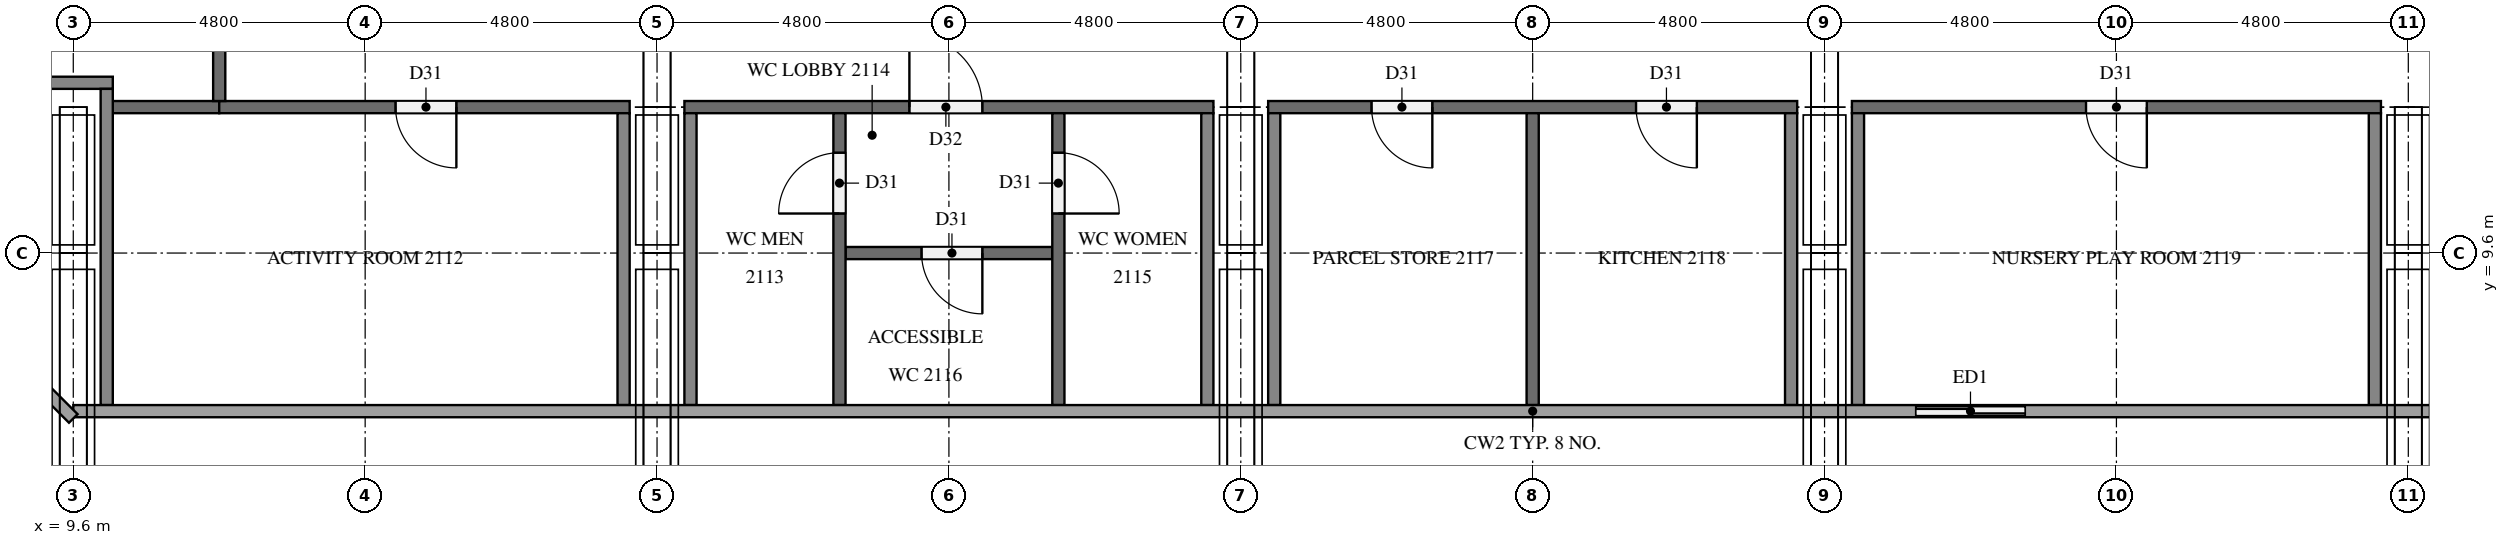
"""IFC4 building model, lengths in metres.
Left out: names, types, materials, properties, quantities, classifications, styles, units other than length and angle.
Written with IfcOpenShell. Run it as: python <this file> out.ifc"""

import sys

from ifc_helpers import new_model, si_unit, direction, frame, frame_2d, origin, place, context, subcontext, project, spatial, rectangle, extrude, element, fill, save


model = new_model("IFC4")
c1 = context("Model", 3, precision=1e-05, world=origin(), true_north=direction((0.0, 1.0)))
c2 = subcontext(c1, "Body", "Model", "MODEL_VIEW")
j1 = project(units=[si_unit("LENGTHUNIT", "METRE"), si_unit("PLANEANGLEUNIT", "RADIAN")], contexts=[c1])
p1 = place(None, origin())
s1 = spatial("IfcSite", under=j1, at=p1, CompositionType="ELEMENT")
p2 = place(p1, origin())
s2 = spatial("IfcBuilding", under=s1, at=p2, CompositionType="ELEMENT")
p3 = place(p2, frame((0.0, 0.0, 83.8)))
s3 = spatial("IfcBuildingStorey", under=s2, at=p3, CompositionType="ELEMENT", Elevation=83.8)
p4 = place(p3, frame((39.6, 7.0, 0.0), z_axis=(0.0, 0.0, 1.0), x_axis=(1.0, 0.0, 0.0)))
e1 = element("IfcWall", 1, at=p4, inside=s3, PredefinedType="SOLIDWALL", context=c2, shape_type="SweptSolid", body=[
    extrude(rectangle(XDim=2.4, YDim=0.15, at=frame_2d((1.2, 0.0))), origin(), (0.0, 0.0, 1.0), 5.1),
])
p5 = place(p4, frame((0.3, 0.0, 0.0)))
e2 = element("IfcOpeningElement", 2, at=p5, cuts=e1, PredefinedType="OPENING", context=c2, shape_type="SweptSolid", body=[
    extrude(rectangle(XDim=1.8, YDim=2.4, at=frame_2d((0.9, 1.2))), frame((0.0, 0.085, 0.0), z_axis=(0.0, -1.0, 0.0), x_axis=(1.0, 0.0, 0.0)), (0.0, 0.0, 1.0), 0.17),
])
p6 = place(p3, frame((25.7, 9.6, 0.0), z_axis=(0.0, 0.0, 1.0), x_axis=(-1.0, 0.0, 0.0)))
e3 = element("IfcWall", 3, at=p6, inside=s3, PredefinedType="PARTITIONING", context=c2, shape_type="SweptSolid", body=[
    extrude(rectangle(XDim=3.4, YDim=0.2, at=frame_2d((1.7, 0.0))), origin(), (0.0, 0.0, 1.0), 5.1),
])
p7 = place(p6, frame((1.15, 0.0, 0.0)))
e4 = element("IfcOpeningElement", 4, at=p7, cuts=e3, PredefinedType="OPENING", context=c2, shape_type="SweptSolid", body=[
    extrude(rectangle(XDim=1.0, YDim=2.1, at=frame_2d((0.5, 1.05))), frame((0.0, 0.11, 0.0), z_axis=(0.0, -1.0, 0.0), x_axis=(1.0, 0.0, 0.0)), (0.0, 0.0, 1.0), 0.22),
])
p8 = place(p3, frame((10.25, 12.0, 0.0), z_axis=(0.0, 0.0, 1.0), x_axis=(1.0, 0.0, 0.0)))
e5 = element("IfcWall", 5, at=p8, inside=s3, PredefinedType="PARTITIONING", context=c2, shape_type="SweptSolid", body=[
    extrude(rectangle(XDim=1.75, YDim=0.2, at=frame_2d((0.875, 0.0))), origin(), (0.0, 0.0, 1.0), 5.1),
])
p9 = place(p3, frame((18.75, 12.0, 0.0), z_axis=(0.0, 0.0, 1.0), x_axis=(-1.0, 0.0, 0.0)))
e6 = element("IfcWall", 6, at=p9, inside=s3, PredefinedType="PARTITIONING", context=c2, shape_type="SweptSolid", body=[
    extrude(rectangle(XDim=6.75, YDim=0.2, at=frame_2d((3.375, 0.0))), origin(), (0.0, 0.0, 1.0), 5.1),
])
p10 = place(p9, frame((2.85, 0.0, 0.0)))
e7 = element("IfcOpeningElement", 7, at=p10, cuts=e6, PredefinedType="OPENING", context=c2, shape_type="SweptSolid", body=[
    extrude(rectangle(XDim=1.0, YDim=2.1, at=frame_2d((0.5, 1.05))), frame((0.0, 0.11, 0.0), z_axis=(0.0, -1.0, 0.0), x_axis=(1.0, 0.0, 0.0)), (0.0, 0.0, 1.0), 0.22),
])
p11 = place(p3, frame((19.65, 12.0, 0.0), z_axis=(0.0, 0.0, 1.0), x_axis=(1.0, 0.0, 0.0)))
e8 = element("IfcWall", 8, at=p11, inside=s3, PredefinedType="PARTITIONING", context=c2, shape_type="SweptSolid", body=[
    extrude(rectangle(XDim=8.7, YDim=0.2, at=frame_2d((4.35, 0.0))), origin(), (0.0, 0.0, 1.0), 5.1),
])
p12 = place(p11, frame((3.7, 0.0, 0.0)))
e9 = element("IfcOpeningElement", 9, at=p12, cuts=e8, PredefinedType="OPENING", context=c2, shape_type="SweptSolid", body=[
    extrude(rectangle(XDim=1.2, YDim=2.1, at=frame_2d((0.6, 1.05))), frame((0.0, 0.11, 0.0), z_axis=(0.0, -1.0, 0.0), x_axis=(1.0, 0.0, 0.0)), (0.0, 0.0, 1.0), 0.22),
])
p13 = place(p3, frame((37.95, 12.0, 0.0), z_axis=(0.0, 0.0, 1.0), x_axis=(-1.0, 0.0, 0.0)))
e10 = element("IfcWall", 10, at=p13, inside=s3, PredefinedType="PARTITIONING", context=c2, shape_type="SweptSolid", body=[
    extrude(rectangle(XDim=8.7, YDim=0.2, at=frame_2d((4.35, 0.0))), origin(), (0.0, 0.0, 1.0), 5.1),
])
p14 = place(p13, frame((6.0, 0.0, 0.0)))
e11 = element("IfcOpeningElement", 11, at=p14, cuts=e10, PredefinedType="OPENING", context=c2, shape_type="SweptSolid", body=[
    extrude(rectangle(XDim=1.0, YDim=2.1, at=frame_2d((0.5, 1.05))), frame((0.0, 0.11, 0.0), z_axis=(0.0, -1.0, 0.0), x_axis=(1.0, 0.0, 0.0)), (0.0, 0.0, 1.0), 0.22),
])
p15 = place(p13, frame((1.65, 0.0, 0.0)))
e12 = element("IfcOpeningElement", 12, at=p15, cuts=e10, PredefinedType="OPENING", context=c2, shape_type="SweptSolid", body=[
    extrude(rectangle(XDim=1.0, YDim=2.1, at=frame_2d((0.5, 1.05))), frame((0.0, 0.11, 0.0), z_axis=(0.0, -1.0, 0.0), x_axis=(1.0, 0.0, 0.0)), (0.0, 0.0, 1.0), 0.22),
])
p16 = place(p3, frame((47.55, 12.0, 0.0), z_axis=(0.0, 0.0, 1.0), x_axis=(-1.0, 0.0, 0.0)))
e13 = element("IfcWall", 13, at=p16, inside=s3, PredefinedType="PARTITIONING", context=c2, shape_type="SweptSolid", body=[
    extrude(rectangle(XDim=8.7, YDim=0.2, at=frame_2d((4.35, 0.0))), origin(), (0.0, 0.0, 1.0), 5.1),
])
p17 = place(p16, frame((3.85, 0.0, 0.0)))
e14 = element("IfcOpeningElement", 14, at=p17, cuts=e13, PredefinedType="OPENING", context=c2, shape_type="SweptSolid", body=[
    extrude(rectangle(XDim=1.0, YDim=2.1, at=frame_2d((0.5, 1.05))), frame((0.0, 0.11, 0.0), z_axis=(0.0, -1.0, 0.0), x_axis=(1.0, 0.0, 0.0)), (0.0, 0.0, 1.0), 0.22),
])
p18 = place(p3, frame((8.95, 12.4, 0.0), z_axis=(0.0, 0.0, 1.0), x_axis=(1.0, 0.0, 0.0)))
e15 = element("IfcWall", 15, at=p18, inside=s3, PredefinedType="PARTITIONING", context=c2, shape_type="SweptSolid", body=[
    extrude(rectangle(XDim=1.3, YDim=0.2, at=frame_2d((0.65, 0.0))), origin(), (0.0, 0.0, 1.0), 5.1),
])
p19 = place(p3, frame((10.15, 7.1, 0.0), z_axis=(0.0, 0.0, 1.0), x_axis=(0.0, 1.0, 0.0)))
e16 = element("IfcWall", 16, at=p19, inside=s3, PredefinedType="PARTITIONING", context=c2, shape_type="SweptSolid", body=[
    extrude(rectangle(XDim=5.2, YDim=0.2, at=frame_2d((2.6, 0.0))), origin(), (0.0, 0.0, 1.0), 5.1),
])
p20 = place(p3, frame((12.0, 12.1, 0.0), z_axis=(0.0, 0.0, 1.0), x_axis=(0.0, 1.0, 0.0)))
e17 = element("IfcWall", 17, at=p20, inside=s3, PredefinedType="PARTITIONING", context=c2, shape_type="SweptSolid", body=[
    extrude(rectangle(XDim=28.6, YDim=0.2, at=frame_2d((14.3, 0.0))), origin(), (0.0, 0.0, 1.0), 5.1),
])
p21 = place(p20, frame((3.05, 0.0, 0.0)))
e18 = element("IfcOpeningElement", 18, at=p21, cuts=e17, PredefinedType="OPENING", context=c2, shape_type="SweptSolid", body=[
    extrude(rectangle(XDim=1.0, YDim=2.1, at=frame_2d((0.5, 1.05))), frame((0.0, 0.11, 0.0), z_axis=(0.0, -1.0, 0.0), x_axis=(1.0, 0.0, 0.0)), (0.0, 0.0, 1.0), 0.22),
])
p22 = place(p20, frame((9.05, 0.0, 0.0)))
e19 = element("IfcOpeningElement", 19, at=p22, cuts=e17, PredefinedType="OPENING", context=c2, shape_type="SweptSolid", body=[
    extrude(rectangle(XDim=1.0, YDim=2.1, at=frame_2d((0.5, 1.05))), frame((0.0, 0.11, 0.0), z_axis=(0.0, -1.0, 0.0), x_axis=(1.0, 0.0, 0.0)), (0.0, 0.0, 1.0), 0.22),
])
p23 = place(p20, frame((13.85, 0.0, 0.0)))
e20 = element("IfcOpeningElement", 20, at=p23, cuts=e17, PredefinedType="OPENING", context=c2, shape_type="SweptSolid", body=[
    extrude(rectangle(XDim=1.0, YDim=2.1, at=frame_2d((0.5, 1.05))), frame((0.0, 0.11, 0.0), z_axis=(0.0, -1.0, 0.0), x_axis=(1.0, 0.0, 0.0)), (0.0, 0.0, 1.0), 0.22),
])
p24 = place(p20, frame((18.65, 0.0, 0.0)))
e21 = element("IfcOpeningElement", 21, at=p24, cuts=e17, PredefinedType="OPENING", context=c2, shape_type="SweptSolid", body=[
    extrude(rectangle(XDim=1.0, YDim=2.1, at=frame_2d((0.5, 1.05))), frame((0.0, 0.11, 0.0), z_axis=(0.0, -1.0, 0.0), x_axis=(1.0, 0.0, 0.0)), (0.0, 0.0, 1.0), 0.22),
])
p25 = place(p20, frame((24.55, 0.0, 0.0)))
e22 = element("IfcOpeningElement", 22, at=p25, cuts=e17, PredefinedType="OPENING", context=c2, shape_type="SweptSolid", body=[
    extrude(rectangle(XDim=1.0, YDim=2.1, at=frame_2d((0.5, 1.05))), frame((0.0, 0.11, 0.0), z_axis=(0.0, -1.0, 0.0), x_axis=(1.0, 0.0, 0.0)), (0.0, 0.0, 1.0), 0.22),
])
for number, where, z_axis, x_axis in (
    (23, (18.65, 7.1, 0.0), (0.0, 0.0, 1.0), (0.0, 1.0, 0.0)),
    (24, (19.75, 7.1, 0.0), (0.0, 0.0, 1.0), (0.0, 1.0, 0.0)),
):
    element("IfcWall", number, at=place(p3, frame(where, z_axis=z_axis, x_axis=x_axis)), inside=s3, PredefinedType="PARTITIONING", context=c2, shape_type="SweptSolid", body=[
        extrude(rectangle(XDim=4.8, YDim=0.2, at=frame_2d((2.4, 0.0))), origin(), (0.0, 0.0, 1.0), 5.1),
    ])
p26 = place(p3, frame((22.2, 7.1, 0.0), z_axis=(0.0, 0.0, 1.0), x_axis=(0.0, 1.0, 0.0)))
e25 = element("IfcWall", 25, at=p26, inside=s3, PredefinedType="PARTITIONING", context=c2, shape_type="SweptSolid", body=[
    extrude(rectangle(XDim=4.8, YDim=0.2, at=frame_2d((2.4, 0.0))), origin(), (0.0, 0.0, 1.0), 5.1),
])
p27 = place(p26, frame((3.15, 0.0, 0.0)))
e26 = element("IfcOpeningElement", 26, at=p27, cuts=e25, PredefinedType="OPENING", context=c2, shape_type="SweptSolid", body=[
    extrude(rectangle(XDim=1.0, YDim=2.1, at=frame_2d((0.5, 1.05))), frame((0.0, 0.11, 0.0), z_axis=(0.0, -1.0, 0.0), x_axis=(1.0, 0.0, 0.0)), (0.0, 0.0, 1.0), 0.22),
])
p28 = place(p3, frame((25.8, 11.9, 0.0), z_axis=(0.0, 0.0, 1.0), x_axis=(0.0, -1.0, 0.0)))
e27 = element("IfcWall", 27, at=p28, inside=s3, PredefinedType="PARTITIONING", context=c2, shape_type="SweptSolid", body=[
    extrude(rectangle(XDim=4.8, YDim=0.2, at=frame_2d((2.4, 0.0))), origin(), (0.0, 0.0, 1.0), 5.1),
])
p29 = place(p28, frame((0.65, 0.0, 0.0)))
e28 = element("IfcOpeningElement", 28, at=p29, cuts=e27, PredefinedType="OPENING", context=c2, shape_type="SweptSolid", body=[
    extrude(rectangle(XDim=1.0, YDim=2.1, at=frame_2d((0.5, 1.05))), frame((0.0, 0.11, 0.0), z_axis=(0.0, -1.0, 0.0), x_axis=(1.0, 0.0, 0.0)), (0.0, 0.0, 1.0), 0.22),
])
for number, where, z_axis, x_axis in (
    (29, (28.25, 7.1, 0.0), (0.0, 0.0, 1.0), (0.0, 1.0, 0.0)),
    (30, (29.35, 7.1, 0.0), (0.0, 0.0, 1.0), (0.0, 1.0, 0.0)),
    (31, (33.6, 7.1, 0.0), (0.0, 0.0, 1.0), (0.0, 1.0, 0.0)),
    (32, (37.85, 7.1, 0.0), (0.0, 0.0, 1.0), (0.0, 1.0, 0.0)),
    (33, (38.95, 7.1, 0.0), (0.0, 0.0, 1.0), (0.0, 1.0, 0.0)),
    (34, (47.45, 7.1, 0.0), (0.0, 0.0, 1.0), (0.0, 1.0, 0.0)),
):
    element("IfcWall", number, at=place(p3, frame(where, z_axis=z_axis, x_axis=x_axis)), inside=s3, PredefinedType="PARTITIONING", context=c2, shape_type="SweptSolid", body=[
        extrude(rectangle(XDim=4.8, YDim=0.2, at=frame_2d((2.4, 0.0))), origin(), (0.0, 0.0, 1.0), 5.1),
    ])
p30 = place(p5, origin())
e35 = element("IfcDoor", 35, at=p30, inside=s3, OperationType="SLIDING_TO_LEFT", PredefinedType="DOOR", context=c2, shape_type="SweptSolid", body=[
    extrude(rectangle(XDim=1.8, YDim=2.4, at=frame_2d((0.9, 1.2))), frame((0.0, 0.025, 0.0), z_axis=(0.0, -1.0, 0.0), x_axis=(1.0, 0.0, 0.0)), (0.0, 0.0, 1.0), 0.05),
])
fill(e2, e35)
p31 = place(p10, origin())
e36 = element("IfcDoor", 36, at=p31, inside=s3, OperationType="SINGLE_SWING_LEFT", PredefinedType="DOOR", context=c2, shape_type="SweptSolid", body=[
    extrude(rectangle(XDim=1.0, YDim=2.1, at=frame_2d((0.5, 1.05))), frame((0.0, 0.025, 0.0), z_axis=(0.0, -1.0, 0.0), x_axis=(1.0, 0.0, 0.0)), (0.0, 0.0, 1.0), 0.05),
])
fill(e7, e36)
p32 = place(p12, origin())
e37 = element("IfcDoor", 37, at=p32, inside=s3, OperationType="SINGLE_SWING_LEFT", PredefinedType="DOOR", context=c2, shape_type="SweptSolid", body=[
    extrude(rectangle(XDim=1.2, YDim=2.1, at=frame_2d((0.6, 1.05))), frame((0.0, 0.025, 0.0), z_axis=(0.0, -1.0, 0.0), x_axis=(1.0, 0.0, 0.0)), (0.0, 0.0, 1.0), 0.05),
])
fill(e9, e37)
p33 = place(p27, origin())
e38 = element("IfcDoor", 38, at=p33, inside=s3, OperationType="SINGLE_SWING_LEFT", PredefinedType="DOOR", context=c2, shape_type="SweptSolid", body=[
    extrude(rectangle(XDim=1.0, YDim=2.1, at=frame_2d((0.5, 1.05))), frame((0.0, 0.025, 0.0), z_axis=(0.0, -1.0, 0.0), x_axis=(1.0, 0.0, 0.0)), (0.0, 0.0, 1.0), 0.05),
])
fill(e26, e38)
p34 = place(p29, origin())
e39 = element("IfcDoor", 39, at=p34, inside=s3, OperationType="SINGLE_SWING_RIGHT", PredefinedType="DOOR", context=c2, shape_type="SweptSolid", body=[
    extrude(rectangle(XDim=1.0, YDim=2.1, at=frame_2d((0.5, 1.05))), frame((0.0, 0.025, 0.0), z_axis=(0.0, -1.0, 0.0), x_axis=(1.0, 0.0, 0.0)), (0.0, 0.0, 1.0), 0.05),
])
fill(e28, e39)
p35 = place(p7, origin())
e40 = element("IfcDoor", 40, at=p35, inside=s3, OperationType="SINGLE_SWING_LEFT", PredefinedType="DOOR", context=c2, shape_type="SweptSolid", body=[
    extrude(rectangle(XDim=1.0, YDim=2.1, at=frame_2d((0.5, 1.05))), frame((0.0, 0.025, 0.0), z_axis=(0.0, -1.0, 0.0), x_axis=(1.0, 0.0, 0.0)), (0.0, 0.0, 1.0), 0.05),
])
fill(e4, e40)
p36 = place(p14, origin())
e41 = element("IfcDoor", 41, at=p36, inside=s3, OperationType="SINGLE_SWING_LEFT", PredefinedType="DOOR", context=c2, shape_type="SweptSolid", body=[
    extrude(rectangle(XDim=1.0, YDim=2.1, at=frame_2d((0.5, 1.05))), frame((0.0, 0.025, 0.0), z_axis=(0.0, -1.0, 0.0), x_axis=(1.0, 0.0, 0.0)), (0.0, 0.0, 1.0), 0.05),
])
fill(e11, e41)
p37 = place(p15, origin())
e42 = element("IfcDoor", 42, at=p37, inside=s3, OperationType="SINGLE_SWING_LEFT", PredefinedType="DOOR", context=c2, shape_type="SweptSolid", body=[
    extrude(rectangle(XDim=1.0, YDim=2.1, at=frame_2d((0.5, 1.05))), frame((0.0, 0.025, 0.0), z_axis=(0.0, -1.0, 0.0), x_axis=(1.0, 0.0, 0.0)), (0.0, 0.0, 1.0), 0.05),
])
fill(e12, e42)
p38 = place(p17, origin())
e43 = element("IfcDoor", 43, at=p38, inside=s3, OperationType="SINGLE_SWING_LEFT", PredefinedType="DOOR", context=c2, shape_type="SweptSolid", body=[
    extrude(rectangle(XDim=1.0, YDim=2.1, at=frame_2d((0.5, 1.05))), frame((0.0, 0.025, 0.0), z_axis=(0.0, -1.0, 0.0), x_axis=(1.0, 0.0, 0.0)), (0.0, 0.0, 1.0), 0.05),
])
fill(e14, e43)
save(model, sys.argv[1])
